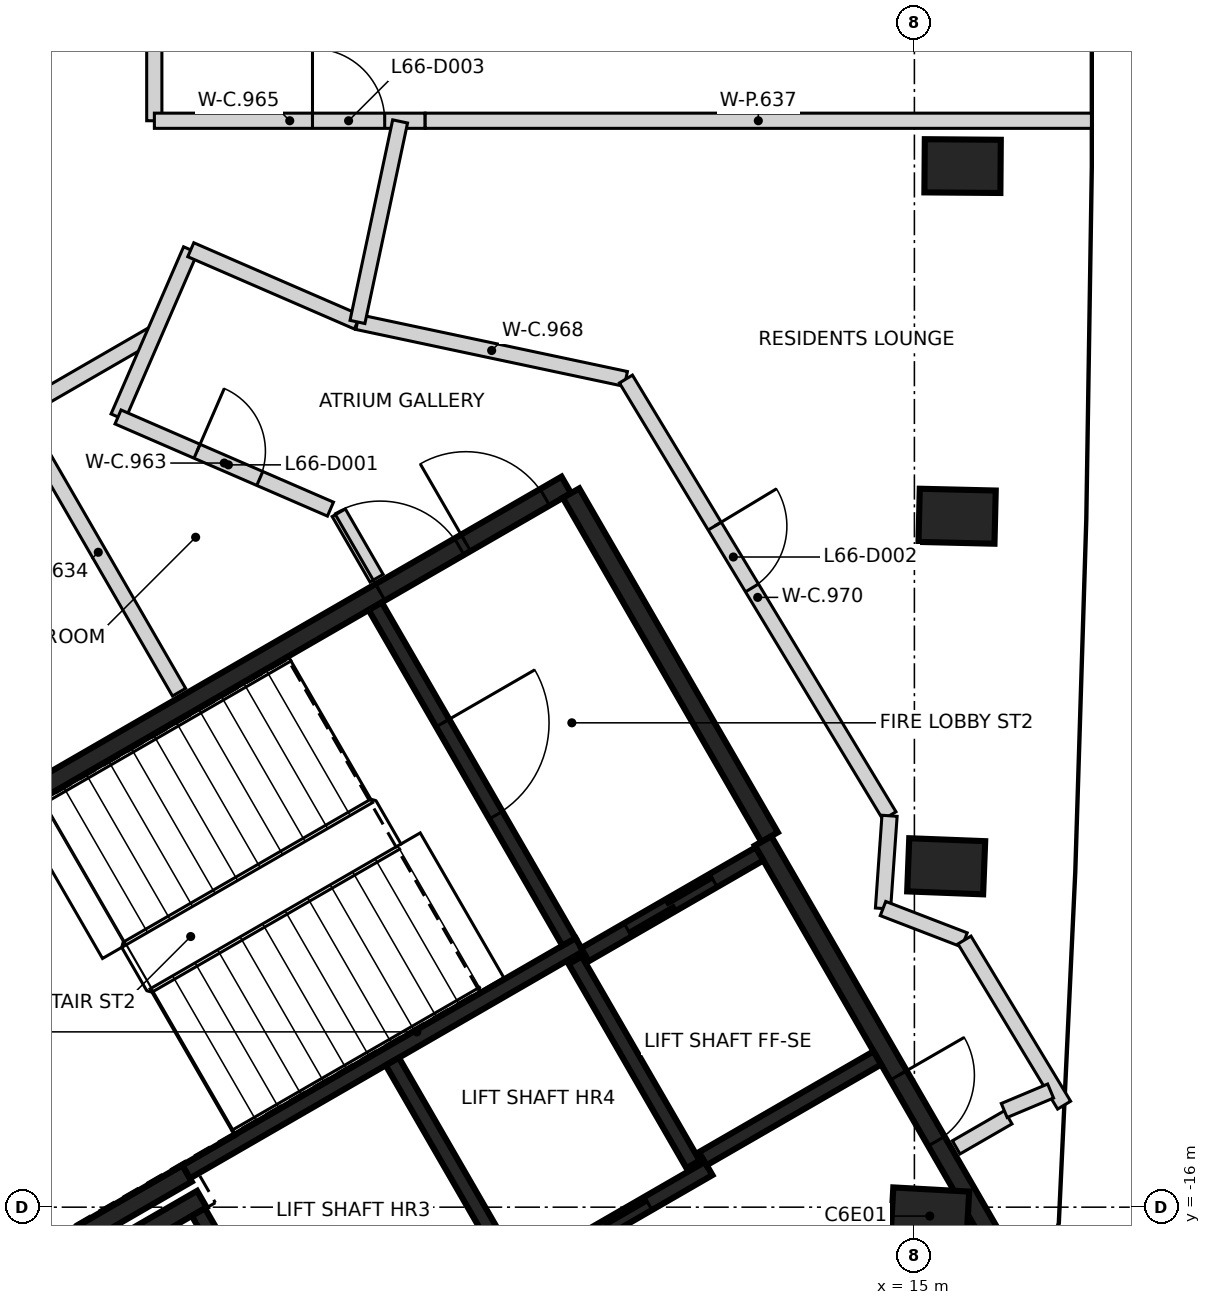
"""IFC4 building model, lengths in metres.
Left out: names, types, materials, properties, quantities, classifications, styles, units other than length and angle.
Written with IfcOpenShell. Run it as: python <this file> out.ifc"""

import sys

from ifc_helpers import new_model, si_unit, direction, frame, frame_2d, origin, origin_2d, place, context, subcontext, project, spatial, rectangle, extrude, element, fill, save


model = new_model("IFC4")
c1 = context("Model", 3, precision=1e-05, world=origin(), true_north=direction((0.0, 1.0)))
c2 = subcontext(c1, "Body", "Model", "MODEL_VIEW")
j1 = project(units=[si_unit("LENGTHUNIT", "METRE"), si_unit("PLANEANGLEUNIT", "RADIAN")], contexts=[c1])
p1 = place(None, origin())
s1 = spatial("IfcSite", under=j1, at=p1, CompositionType="ELEMENT")
p2 = place(p1, origin())
s2 = spatial("IfcBuilding", under=s1, at=p2, CompositionType="ELEMENT")
p3 = place(p2, frame((0.0, 0.0, 262.2)))
s3 = spatial("IfcBuildingStorey", under=s2, at=p3, CompositionType="ELEMENT", Elevation=262.2)
for number, where, z_axis, x_axis in (
    (1, (15.202, -16.117, -0.35), (0.0, 0.0, 1.0), (-0.998, 0.055, 0.0)),
    (2, (15.418, -11.515, -0.35), (0.0, 0.0, 1.0), (-0.999, 0.039, 0.0)),
    (3, (15.562, -6.91, -0.35), (0.0, 0.0, 1.0), (-1.0, 0.024, 0.0)),
    (4, (15.634, -2.303, -0.35), (0.0, 0.0, 1.0), (-1.0, 0.008, 0.0)),
):
    element("IfcColumn", number, at=place(p3, frame(where, z_axis=z_axis, x_axis=x_axis)), inside=s3, PredefinedType="COLUMN", context=c2, shape_type="SweptSolid", body=[
        extrude(rectangle(XDim=1.0, YDim=0.7, at=origin_2d()), origin(), (0.0, 0.0, 1.0), 3.6),
    ])
p4 = place(p3, frame((0.417, -12.273, 0.0), z_axis=(0.0, 0.0, 1.0), x_axis=(0.866021906294, 0.500006057782, 0.0)))
e5 = element("IfcWall", 5, at=p4, inside=s3, PredefinedType="SHEAR", context=c2, shape_type="SweptSolid", body=[
    extrude(rectangle(XDim=11.55, YDim=0.25, at=frame_2d((5.775, 0.0))), origin(), (0.0, 0.0, 1.0), 3.25),
])
p5 = place(p4, frame((10.025, 0.0, 0.0)))
e6 = element("IfcOpeningElement", 6, at=p5, cuts=e5, PredefinedType="OPENING", context=c2, shape_type="SweptSolid", body=[
    extrude(rectangle(XDim=1.2, YDim=2.1, at=frame_2d((0.6, 1.05))), frame((0.0, 0.135, 0.0), z_axis=(0.0, -1.0, 0.0), x_axis=(1.0, 0.0, 0.0)), (0.0, 0.0, 1.0), 0.27),
])
p6 = place(p4, frame((8.725, 0.0, 0.0)))
e7 = element("IfcOpeningElement", 7, at=p6, cuts=e5, PredefinedType="OPENING", context=c2, shape_type="SweptSolid", body=[
    extrude(rectangle(XDim=1.2, YDim=2.1, at=frame_2d((0.6, 1.05))), frame((0.0, 0.135, 0.0), z_axis=(0.0, -1.0, 0.0), x_axis=(1.0, 0.0, 0.0)), (0.0, 0.0, 1.0), 0.27),
])
p7 = place(p3, frame((13.008, -11.181, 0.0), z_axis=(0.0, 0.0, 1.0), x_axis=(0.500001955336, -0.866024274868, 0.0)))
e8 = element("IfcWall", 8, at=p7, inside=s3, PredefinedType="SHEAR", context=c2, shape_type="SweptSolid", body=[
    extrude(rectangle(XDim=6.125, YDim=0.25, at=frame_2d((3.062, 0.0))), origin(), (0.0, 0.0, 1.0), 3.25),
])
p8 = place(p7, frame((3.563, 0.0, 0.0)))
e9 = element("IfcOpeningElement", 9, at=p8, cuts=e8, PredefinedType="OPENING", context=c2, shape_type="SweptSolid", body=[
    extrude(rectangle(XDim=1.0, YDim=2.1, at=frame_2d((0.5, 1.05))), frame((0.0, 0.135, 0.0), z_axis=(0.0, -1.0, 0.0), x_axis=(1.0, 0.0, 0.0)), (0.0, 0.0, 1.0), 0.27),
])
p9 = place(p3, frame((10.483, -6.606, 0.0), z_axis=(0.0, 0.0, 1.0), x_axis=(0.49999885962, -0.866026062182, 0.0)))
e10 = element("IfcWall", 10, at=p9, inside=s3, PredefinedType="SHEAR", context=c2, shape_type="SweptSolid", body=[
    extrude(rectangle(XDim=5.225, YDim=0.25, at=frame_2d((2.612, 0.0))), origin(), (0.0, 0.0, 1.0), 3.25),
])
p10 = place(p3, frame((5.431, -15.556, 0.0), z_axis=(0.0, 0.0, 1.0), x_axis=(-0.866022940537, -0.500004266446, 0.0)))
e11 = element("IfcWall", 11, at=p10, inside=s3, PredefinedType="SHEAR", context=c2, shape_type="SweptSolid", body=[
    extrude(rectangle(XDim=2.575, YDim=0.25, at=frame_2d((1.287, 0.0))), origin(), (0.0, 0.0, 1.0), 3.25),
])
p11 = place(p3, frame((4.145, -16.749, 0.0), z_axis=(0.0, 0.0, 1.0), x_axis=(0.866038183914, 0.499977863513, 0.0)))
e12 = element("IfcWall", 12, at=p11, inside=s3, PredefinedType="SHEAR", context=c2, shape_type="SweptSolid", body=[
    extrude(rectangle(XDim=1.71, YDim=0.25, at=frame_2d((0.855, 0.0))), origin(), (0.0, 0.0, 1.0), 3.25),
])
p12 = place(p3, frame((5.419, -15.534, 0.0), z_axis=(0.0, 0.0, 1.0), x_axis=(0.866029065029, 0.499993658486, 0.0)))
e13 = element("IfcWall", 13, at=p12, inside=s3, PredefinedType="SHEAR", context=c2, shape_type="SweptSolid", body=[
    extrude(rectangle(XDim=5.974, YDim=0.2, at=frame_2d((2.987, 0.0))), origin(), (0.0, 0.0, 1.0), 3.25),
])
p13 = place(p3, frame((7.01, -18.542, 0.0), z_axis=(0.0, 0.0, 1.0), x_axis=(0.866030299012, 0.499991521122, 0.0)))
e14 = element("IfcWall", 14, at=p13, inside=s3, PredefinedType="SHEAR", context=c2, shape_type="SweptSolid", body=[
    extrude(rectangle(XDim=6.1, YDim=0.2, at=frame_2d((3.05, 0.0))), origin(), (0.0, 0.0, 1.0), 3.25),
])
p14 = place(p13, frame((1.0, 0.0, 0.0)))
e15 = element("IfcOpeningElement", 15, at=p14, cuts=e14, PredefinedType="OPENING", context=c2, shape_type="SweptSolid", body=[
    extrude(rectangle(XDim=1.2, YDim=2.1, at=frame_2d((0.6, 1.05))), frame((0.0, 0.11, 0.0), z_axis=(0.0, -1.0, 0.0), x_axis=(1.0, 0.0, 0.0)), (0.0, 0.0, 1.0), 0.22),
])
p15 = place(p13, frame((3.982, 0.0, 0.0)))
e16 = element("IfcOpeningElement", 16, at=p15, cuts=e14, PredefinedType="OPENING", context=c2, shape_type="SweptSolid", body=[
    extrude(rectangle(XDim=1.2, YDim=2.1, at=frame_2d((0.6, 1.05))), frame((0.0, 0.11, 0.0), z_axis=(0.0, -1.0, 0.0), x_axis=(1.0, 0.0, 0.0)), (0.0, 0.0, 1.0), 0.22),
])
p16 = place(p3, frame((7.906, -8.094, 0.0), z_axis=(0.0, 0.0, 1.0), x_axis=(0.500027839223, -0.866009330205, 0.0)))
e17 = element("IfcWall", 17, at=p16, inside=s3, PredefinedType="SHEAR", context=c2, shape_type="SweptSolid", body=[
    extrude(rectangle(XDim=5.098, YDim=0.2, at=frame_2d((2.549, 0.0))), origin(), (0.0, 0.0, 1.0), 3.25),
])
p17 = place(p16, frame((1.774, 0.0, 0.0)))
e18 = element("IfcOpeningElement", 18, at=p17, cuts=e17, PredefinedType="OPENING", context=c2, shape_type="SweptSolid", body=[
    extrude(rectangle(XDim=1.4, YDim=2.1, at=frame_2d((0.7, 1.05))), frame((0.0, 0.11, 0.0), z_axis=(0.0, -1.0, 0.0), x_axis=(1.0, 0.0, 0.0)), (0.0, 0.0, 1.0), 0.22),
])
p18 = place(p3, frame((8.132, -14.084, 0.0), z_axis=(0.0, 0.0, 1.0), x_axis=(0.499997778408, -0.866026686418, 0.0)))
e19 = element("IfcWall", 19, at=p18, inside=s3, PredefinedType="SHEAR", context=c2, shape_type="SweptSolid", body=[
    extrude(rectangle(XDim=3.198, YDim=0.2, at=frame_2d((1.599, 0.0))), origin(), (0.0, 0.0, 1.0), 3.25),
])
p19 = place(p3, frame((6.96, -18.455, 0.0), z_axis=(0.0, 0.0, 1.0), x_axis=(-0.499926705758, 0.866067716099, 0.0)))
e20 = element("IfcWall", 20, at=p19, inside=s3, PredefinedType="SHEAR", context=c2, shape_type="SweptSolid", body=[
    extrude(rectangle(XDim=2.759, YDim=0.2, at=frame_2d((1.38, 0.0))), origin(), (0.0, 0.0, 1.0), 3.25),
])
p20 = place(p3, frame((12.088, -15.437, 0.0), z_axis=(0.0, 0.0, 1.0), x_axis=(-0.500026960575, 0.86600983753, 0.0)))
e21 = element("IfcWall", 21, at=p20, inside=s3, PredefinedType="SHEAR", context=c2, shape_type="SweptSolid", body=[
    extrude(rectangle(XDim=3.1, YDim=0.2, at=frame_2d((1.55, 0.0))), origin(), (0.0, 0.0, 1.0), 3.25),
])
p21 = place(p3, frame((10.666, -12.678, 0.0), z_axis=(0.0, 0.0, 1.0), x_axis=(0.866018407898, 0.500012117035, 0.0)))
e22 = element("IfcWall", 22, at=p21, inside=s3, PredefinedType="SHEAR", context=c2, shape_type="SweptSolid", body=[
    extrude(rectangle(XDim=2.651, YDim=0.2, at=frame_2d((1.325, 0.0))), origin(), (0.0, 0.0, 1.0), 3.25),
])
p22 = place(p21, frame((0.652, 0.0, 0.0)))
e23 = element("IfcOpeningElement", 23, at=p22, cuts=e22, PredefinedType="OPENING", context=c2, shape_type="SweptSolid", body=[
    extrude(rectangle(XDim=1.3, YDim=2.1, at=frame_2d((0.65, 1.05))), frame((0.0, 0.11, 0.0), z_axis=(0.0, -1.0, 0.0), x_axis=(1.0, 0.0, 0.0)), (0.0, 0.0, 1.0), 0.22),
])
p23 = place(p3, frame((14.512, -14.037, 0.0), z_axis=(0.0, 0.0, 1.0), x_axis=(-0.866018407898, -0.500012117035, 0.0)))
e24 = element("IfcWall", 24, at=p23, inside=s3, PredefinedType="SHEAR", context=c2, shape_type="SweptSolid", body=[
    extrude(rectangle(XDim=2.651, YDim=0.2, at=frame_2d((1.325, 0.0))), origin(), (0.0, 0.0, 1.0), 3.25),
])
p24 = place(p3, frame((1.401, -6.583, 0.0), z_axis=(0.0, 0.0, 1.0), x_axis=(0.865818713766, 0.500357826853, 0.0)))
e25 = element("IfcWall", 25, at=p24, inside=s3, PredefinedType="PARTITIONING", context=c2, shape_type="SweptSolid", body=[
    extrude(rectangle(XDim=4.157, YDim=0.2, at=frame_2d((2.079, 0.0))), origin(), (0.0, 0.0, 1.0), 3.25),
])
p25 = place(p3, frame((4.523, -5.604, 0.0), z_axis=(0.0, 0.0, 1.0), x_axis=(0.398033282066, 0.917370975324, 0.0)))
e26 = element("IfcWall", 26, at=p25, inside=s3, PredefinedType="PARTITIONING", context=c2, shape_type="SweptSolid", body=[
    extrude(rectangle(XDim=2.397, YDim=0.2, at=frame_2d((1.198, 0.0))), origin(), (0.0, 0.0, 1.0), 3.25),
])
p26 = place(p3, frame((4.523, -5.604, 0.0), z_axis=(0.0, 0.0, 1.0), x_axis=(0.917390838441, -0.397987499231, 0.0)))
e27 = element("IfcWall", 27, at=p26, inside=s3, PredefinedType="PARTITIONING", context=c2, shape_type="SweptSolid", body=[
    extrude(rectangle(XDim=3.046, YDim=0.2, at=frame_2d((1.523, 0.0))), origin(), (0.0, 0.0, 1.0), 3.25),
])
p27 = place(p26, frame((1.133, 0.0, 0.0)))
e28 = element("IfcOpeningElement", 28, at=p27, cuts=e27, PredefinedType="OPENING", context=c2, shape_type="SweptSolid", body=[
    extrude(rectangle(XDim=0.9, YDim=2.1, at=frame_2d((0.45, 1.05))), frame((0.0, 0.11, 0.0), z_axis=(0.0, -1.0, 0.0), x_axis=(1.0, 0.0, 0.0)), (0.0, 0.0, 1.0), 0.22),
])
p28 = place(p3, frame((5.0, -1.707, 0.0), z_axis=(0.0, 0.0, 1.0), x_axis=(0.0, 1.0, 0.0)))
e29 = element("IfcWall", 29, at=p28, inside=s3, PredefinedType="PARTITIONING", context=c2, shape_type="SweptSolid", body=[
    extrude(rectangle(XDim=6.211, YDim=0.2, at=frame_2d((3.105, 0.0))), origin(), (0.0, 0.0, 1.0), 3.25),
])
p29 = place(p28, frame((4.605, 0.0, 0.0)))
e30 = element("IfcOpeningElement", 30, at=p29, cuts=e29, PredefinedType="OPENING", context=c2, shape_type="SweptSolid", body=[
    extrude(rectangle(XDim=1.0, YDim=2.1, at=frame_2d((0.5, 1.05))), frame((0.0, 0.11, 0.0), z_axis=(0.0, -1.0, 0.0), x_axis=(1.0, 0.0, 0.0)), (0.0, 0.0, 1.0), 0.22),
])
p30 = place(p3, frame((5.001, -1.707, 0.0), z_axis=(0.0, 0.0, 1.0), x_axis=(1.0, 0.0, 0.0)))
e31 = element("IfcWall", 31, at=p30, inside=s3, PredefinedType="PARTITIONING", context=c2, shape_type="SweptSolid", body=[
    extrude(rectangle(XDim=3.562, YDim=0.2, at=frame_2d((1.781, 0.0))), origin(), (0.0, 0.0, 1.0), 3.25),
])
p31 = place(p30, frame((2.08, 0.0, 0.0)))
e32 = element("IfcOpeningElement", 32, at=p31, cuts=e31, PredefinedType="OPENING", context=c2, shape_type="SweptSolid", body=[
    extrude(rectangle(XDim=0.95, YDim=2.1, at=frame_2d((0.475, 1.05))), frame((0.0, 0.11, 0.0), z_axis=(0.0, -1.0, 0.0), x_axis=(1.0, 0.0, 0.0)), (0.0, 0.0, 1.0), 0.22),
])
p32 = place(p3, frame((5.48, -3.404, 0.0), z_axis=(0.0, 0.0, 1.0), x_axis=(0.917402729571, -0.39796008817, 0.0)))
e33 = element("IfcWall", 33, at=p32, inside=s3, PredefinedType="PARTITIONING", context=c2, shape_type="SweptSolid", body=[
    extrude(rectangle(XDim=2.389, YDim=0.2, at=frame_2d((1.195, 0.0))), origin(), (0.0, 0.0, 1.0), 3.25),
])
p33 = place(p3, frame((7.427, -6.864, 0.0), z_axis=(0.0, 0.0, 1.0), x_axis=(0.499942098031, -0.866058830921, 0.0)))
e34 = element("IfcWall", 34, at=p33, inside=s3, PredefinedType="PARTITIONING", context=c2, shape_type="SweptSolid", body=[
    extrude(rectangle(XDim=0.994, YDim=0.2, at=frame_2d((0.497, 0.0))), origin(), (0.0, 0.0, 1.0), 3.25),
])
p34 = place(p3, frame((7.673, -4.355, 0.0), z_axis=(0.0, 0.0, 1.0), x_axis=(0.978232876952, -0.207510092407, 0.0)))
e35 = element("IfcWall", 35, at=p34, inside=s3, PredefinedType="PARTITIONING", context=c2, shape_type="SweptSolid", body=[
    extrude(rectangle(XDim=3.61, YDim=0.2, at=frame_2d((1.805, 0.0))), origin(), (0.0, 0.0, 1.0), 3.25),
])
p35 = place(p3, frame((7.673, -4.354, 0.0), z_axis=(0.0, 0.0, 1.0), x_axis=(0.207939957157, 0.978141592111, 0.0)))
e36 = element("IfcWall", 36, at=p35, inside=s3, PredefinedType="PARTITIONING", context=c2, shape_type="SweptSolid", body=[
    extrude(rectangle(XDim=2.697, YDim=0.2, at=frame_2d((1.348, 0.0))), origin(), (0.0, 0.0, 1.0), 3.25),
])
p36 = place(p3, frame((11.205, -5.105, 0.0), z_axis=(0.0, 0.0, 1.0), x_axis=(0.516682442017, -0.856177116087, 0.0)))
e37 = element("IfcWall", 37, at=p36, inside=s3, PredefinedType="PARTITIONING", context=c2, shape_type="SweptSolid", body=[
    extrude(rectangle(XDim=6.71, YDim=0.2, at=frame_2d((3.355, 0.0))), origin(), (0.0, 0.0, 1.0), 3.25),
])
p37 = place(p36, frame((2.26, 0.0, 0.0)))
e38 = element("IfcOpeningElement", 38, at=p37, cuts=e37, PredefinedType="OPENING", context=c2, shape_type="SweptSolid", body=[
    extrude(rectangle(XDim=0.95, YDim=2.1, at=frame_2d((0.475, 1.05))), frame((0.0, 0.11, 0.0), z_axis=(0.0, -1.0, 0.0), x_axis=(1.0, 0.0, 0.0)), (0.0, 0.0, 1.0), 0.22),
])
p38 = place(p3, frame((14.587, -12.071, 0.0), z_axis=(0.0, 0.0, 1.0), x_axis=(0.070466777423, 0.997514126857, 0.0)))
e39 = element("IfcWall", 39, at=p38, inside=s3, PredefinedType="PARTITIONING", context=c2, shape_type="SweptSolid", body=[
    extrude(rectangle(XDim=1.223, YDim=0.2, at=frame_2d((0.611, 0.0))), origin(), (0.0, 0.0, 1.0), 3.25),
])
p39 = place(p3, frame((14.587, -12.071, 0.0), z_axis=(0.0, 0.0, 1.0), x_axis=(0.933192153307, -0.359377802606, 0.0)))
e40 = element("IfcWall", 40, at=p39, inside=s3, PredefinedType="PARTITIONING", context=c2, shape_type="SweptSolid", body=[
    extrude(rectangle(XDim=1.149, YDim=0.2, at=frame_2d((0.574, 0.0))), origin(), (0.0, 0.0, 1.0), 2.35),
])
p40 = place(p3, frame((15.55, -15.213, 0.0), z_axis=(0.0, 0.0, 1.0), x_axis=(0.865989998118, 0.500061319399, 0.0)))
e41 = element("IfcWall", 41, at=p40, inside=s3, PredefinedType="PARTITIONING", context=c2, shape_type="SweptSolid", body=[
    extrude(rectangle(XDim=0.79, YDim=0.2, at=frame_2d((0.395, 0.0))), origin(), (0.0, 0.0, 1.0), 3.25),
])
p41 = place(p3, frame((15.659, -12.485, 0.0), z_axis=(0.0, 0.0, 1.0), x_axis=(0.516729412104, -0.856148769003, 0.0)))
e42 = element("IfcWall", 42, at=p41, inside=s3, PredefinedType="PARTITIONING", context=c2, shape_type="SweptSolid", body=[
    extrude(rectangle(XDim=2.538, YDim=0.2, at=frame_2d((1.269, 0.0))), origin(), (0.0, 0.0, 1.0), 3.25),
])
p42 = place(p3, frame((16.182, -14.728, 0.0), z_axis=(0.0, 0.0, 1.0), x_axis=(0.922058491377, 0.387050563207, 0.0)))
e43 = element("IfcWall", 43, at=p42, inside=s3, PredefinedType="PARTITIONING", context=c2, shape_type="SweptSolid", body=[
    extrude(rectangle(XDim=0.662, YDim=0.2, at=frame_2d((0.331, 0.0))), origin(), (0.0, 0.0, 1.0), 3.25),
])
p43 = place(p3, frame((3.2, -5.543, 0.0), z_axis=(0.0, 0.0, 1.0), x_axis=(0.500060428066, -0.865990512813, 0.0)))
e44 = element("IfcWall", 44, at=p43, inside=s3, PredefinedType="PARTITIONING", context=c2, shape_type="SweptSolid", body=[
    extrude(rectangle(XDim=4.252, YDim=0.2, at=frame_2d((2.126, 0.0))), origin(), (0.0, 0.0, 1.0), 3.25),
])
p44 = place(p3, frame((8.564, -1.707, 0.0), z_axis=(0.0, 0.0, 1.0), x_axis=(1.0, 0.0, 0.0)))
e45 = element("IfcWall", 45, at=p44, inside=s3, PredefinedType="PARTITIONING", context=c2, shape_type="SweptSolid", body=[
    extrude(rectangle(XDim=8.765, YDim=0.2, at=frame_2d((4.383, 0.0))), origin(), (0.0, 0.0, 1.0), 2.35),
])
p45 = place(p22, origin())
e46 = element("IfcDoor", 46, at=p45, inside=s3, OperationType="SLIDING_TO_RIGHT", PredefinedType="DOOR", context=c2, shape_type="SweptSolid", body=[
    extrude(rectangle(XDim=1.3, YDim=2.1, at=frame_2d((0.65, 1.05))), frame((0.0, 0.025, 0.0), z_axis=(0.0, -1.0, 0.0), x_axis=(1.0, 0.0, 0.0)), (0.0, 0.0, 1.0), 0.05),
])
fill(e23, e46)
p46 = place(p15, origin())
e47 = element("IfcDoor", 47, at=p46, inside=s3, OperationType="DOUBLE_DOOR_SLIDING", PredefinedType="DOOR", context=c2, shape_type="SweptSolid", body=[
    extrude(rectangle(XDim=1.2, YDim=2.1, at=frame_2d((0.6, 1.05))), frame((0.0, 0.025, 0.0), z_axis=(0.0, -1.0, 0.0), x_axis=(1.0, 0.0, 0.0)), (0.0, 0.0, 1.0), 0.05),
])
fill(e16, e47)
p47 = place(p8, origin())
e48 = element("IfcDoor", 48, at=p47, inside=s3, OperationType="SINGLE_SWING_LEFT", PredefinedType="DOOR", context=c2, shape_type="SweptSolid", body=[
    extrude(rectangle(XDim=1.0, YDim=2.1, at=frame_2d((0.5, 1.05))), frame((0.0, 0.025, 0.0), z_axis=(0.0, -1.0, 0.0), x_axis=(1.0, 0.0, 0.0)), (0.0, 0.0, 1.0), 0.05),
])
fill(e9, e48)
p48 = place(p5, origin())
e49 = element("IfcDoor", 49, at=p48, inside=s3, OperationType="SINGLE_SWING_LEFT", PredefinedType="DOOR", context=c2, shape_type="SweptSolid", body=[
    extrude(rectangle(XDim=1.2, YDim=2.1, at=frame_2d((0.6, 1.05))), frame((0.0, 0.025, 0.0), z_axis=(0.0, -1.0, 0.0), x_axis=(1.0, 0.0, 0.0)), (0.0, 0.0, 1.0), 0.05),
])
fill(e6, e49)
p49 = place(p6, origin())
e50 = element("IfcDoor", 50, at=p49, inside=s3, OperationType="SINGLE_SWING_RIGHT", PredefinedType="DOOR", context=c2, shape_type="SweptSolid", body=[
    extrude(rectangle(XDim=1.2, YDim=2.1, at=frame_2d((0.6, 1.05))), frame((0.0, 0.025, 0.0), z_axis=(0.0, -1.0, 0.0), x_axis=(1.0, 0.0, 0.0)), (0.0, 0.0, 1.0), 0.05),
])
fill(e7, e50)
p50 = place(p17, origin())
e51 = element("IfcDoor", 51, at=p50, inside=s3, OperationType="SINGLE_SWING_RIGHT", PredefinedType="DOOR", context=c2, shape_type="SweptSolid", body=[
    extrude(rectangle(XDim=1.4, YDim=2.1, at=frame_2d((0.7, 1.05))), frame((0.0, 0.025, 0.0), z_axis=(0.0, -1.0, 0.0), x_axis=(1.0, 0.0, 0.0)), (0.0, 0.0, 1.0), 0.05),
])
fill(e18, e51)
p51 = place(p27, frame((0.9, 0.0, 0.0), z_axis=(0.0, 0.0, 1.0), x_axis=(-1.0, 0.0, 0.0)))
e52 = element("IfcDoor", 52, at=p51, inside=s3, OperationType="SINGLE_SWING_LEFT", PredefinedType="DOOR", context=c2, shape_type="SweptSolid", body=[
    extrude(rectangle(XDim=0.9, YDim=2.1, at=frame_2d((0.45, 1.05))), frame((0.0, 0.025, 0.0), z_axis=(0.0, -1.0, 0.0), x_axis=(1.0, 0.0, 0.0)), (0.0, 0.0, 1.0), 0.05),
])
fill(e28, e52)
p52 = place(p37, origin())
e53 = element("IfcDoor", 53, at=p52, inside=s3, OperationType="SINGLE_SWING_LEFT", PredefinedType="DOOR", context=c2, shape_type="SweptSolid", body=[
    extrude(rectangle(XDim=0.95, YDim=2.1, at=frame_2d((0.475, 1.05))), frame((0.0, 0.025, 0.0), z_axis=(0.0, -1.0, 0.0), x_axis=(1.0, 0.0, 0.0)), (0.0, 0.0, 1.0), 0.05),
])
fill(e38, e53)
p53 = place(p31, origin())
e54 = element("IfcDoor", 54, at=p53, inside=s3, OperationType="SINGLE_SWING_LEFT", PredefinedType="DOOR", context=c2, shape_type="SweptSolid", body=[
    extrude(rectangle(XDim=0.95, YDim=2.1, at=frame_2d((0.475, 1.05))), frame((0.0, 0.025, 0.0), z_axis=(0.0, -1.0, 0.0), x_axis=(1.0, 0.0, 0.0)), (0.0, 0.0, 1.0), 0.05),
])
fill(e32, e54)
save(model, sys.argv[1])
